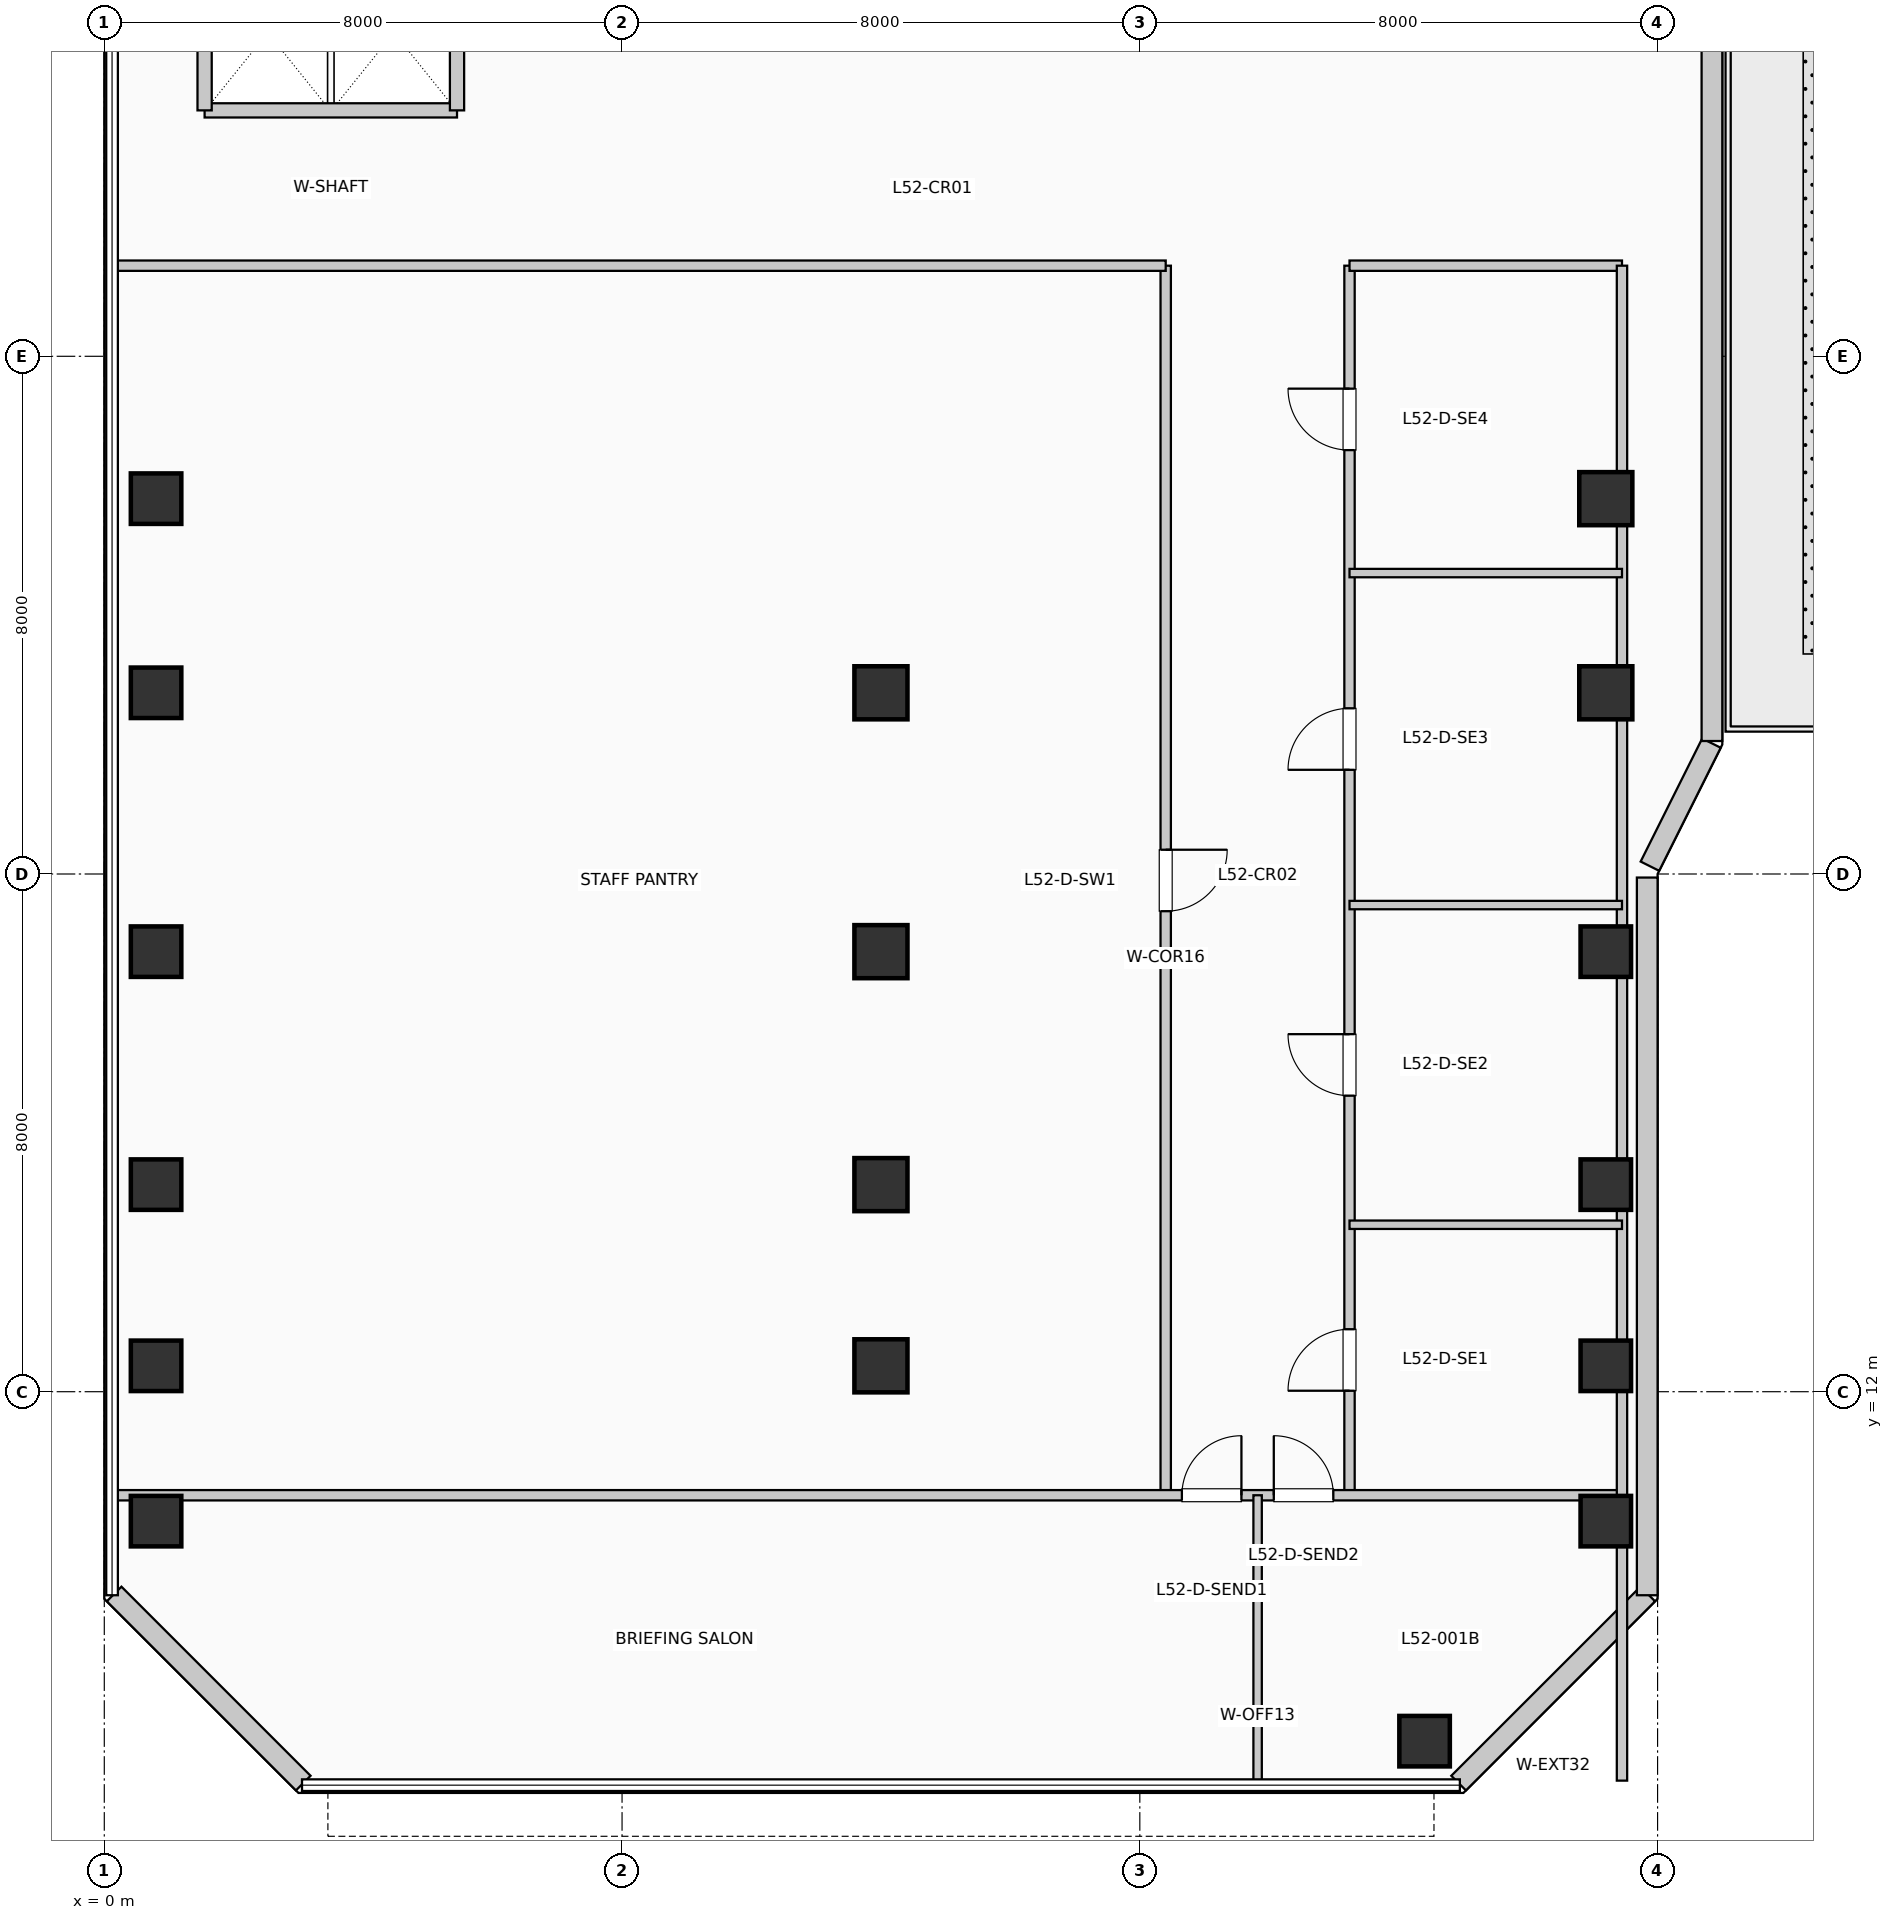
"""IFC4 building model, lengths in metres.
Left out: names, types, materials, properties, quantities, classifications, styles, units other than length and angle.
Written with IfcOpenShell. Run it as: python <this file> out.ifc"""

import sys

from ifc_helpers import new_model, si_unit, direction, frame, frame_2d, origin, origin_2d, place, context, subcontext, project, spatial, rectangle, extrude, element, fill, save


model = new_model("IFC4")
c1 = context("Model", 3, precision=1e-05, world=origin(), true_north=direction((0.0, 1.0)))
c2 = subcontext(c1, "Body", "Model", "MODEL_VIEW")
j1 = project(units=[si_unit("LENGTHUNIT", "METRE"), si_unit("PLANEANGLEUNIT", "RADIAN")], contexts=[c1])
p1 = place(None, origin())
s1 = spatial("IfcSite", under=j1, at=p1, CompositionType="ELEMENT")
p2 = place(p1, origin())
s2 = spatial("IfcBuilding", under=s1, at=p2, CompositionType="ELEMENT")
p3 = place(p2, frame((0.0, 0.0, 215.16)))
s3 = spatial("IfcBuildingStorey", under=s2, at=p3, CompositionType="ELEMENT", Elevation=215.16)
for number, where, z_axis, x_axis in (
    (1, (0.8, 10.0, 0.0), (0.0, 0.0, 1.0), (1.0, 0.0, 0.0)),
    (2, (0.8, 12.4, 0.0), (0.0, 0.0, 1.0), (1.0, 0.0, 0.0)),
    (3, (0.8, 15.2, 0.0), (0.0, 0.0, 1.0), (1.0, 0.0, 0.0)),
    (4, (0.8, 18.8, 0.0), (0.0, 0.0, 1.0), (1.0, 0.0, 0.0)),
    (5, (0.8, 22.8, 0.0), (0.0, 0.0, 1.0), (1.0, 0.0, 0.0)),
    (6, (0.8, 25.8, 0.0), (0.0, 0.0, 1.0), (1.0, 0.0, 0.0)),
):
    element("IfcColumn", number, at=place(p3, frame(where, z_axis=z_axis, x_axis=x_axis)), inside=s3, PredefinedType="COLUMN", context=c2, shape_type="SweptSolid", body=[
        extrude(rectangle(XDim=0.78, YDim=0.78, at=origin_2d()), origin(), (0.0, 0.0, 1.0), 4.62),
    ])
for number, where, z_axis, x_axis in (
    (7, (12.0, 12.4, 0.0), (0.0, 0.0, 1.0), (1.0, 0.0, 0.0)),
    (8, (12.0, 15.2, 0.0), (0.0, 0.0, 1.0), (1.0, 0.0, 0.0)),
    (9, (12.0, 18.8, 0.0), (0.0, 0.0, 1.0), (1.0, 0.0, 0.0)),
    (10, (12.0, 22.8, 0.0), (0.0, 0.0, 1.0), (1.0, 0.0, 0.0)),
):
    element("IfcColumn", number, at=place(p3, frame(where, z_axis=z_axis, x_axis=x_axis)), inside=s3, PredefinedType="COLUMN", context=c2, shape_type="SweptSolid", body=[
        extrude(rectangle(XDim=0.82, YDim=0.82, at=origin_2d()), origin(), (0.0, 0.0, 1.0), 4.62),
    ])
for number, where, z_axis, x_axis in (
    (11, (20.4, 6.6, 0.0), (0.0, 0.0, 1.0), (1.0, 0.0, 0.0)),
    (12, (23.2, 10.0, 0.0), (0.0, 0.0, 1.0), (1.0, 0.0, 0.0)),
    (13, (23.2, 12.4, 0.0), (0.0, 0.0, 1.0), (1.0, 0.0, 0.0)),
    (14, (23.2, 15.2, 0.0), (0.0, 0.0, 1.0), (1.0, 0.0, 0.0)),
    (15, (23.2, 18.8, 0.0), (0.0, 0.0, 1.0), (1.0, 0.0, 0.0)),
):
    element("IfcColumn", number, at=place(p3, frame(where, z_axis=z_axis, x_axis=x_axis)), inside=s3, PredefinedType="COLUMN", context=c2, shape_type="SweptSolid", body=[
        extrude(rectangle(XDim=0.78, YDim=0.78, at=origin_2d()), origin(), (0.0, 0.0, 1.0), 4.62),
    ])
for number, where, z_axis, x_axis in (
    (16, (23.2, 22.8, 0.0), (0.0, 0.0, 1.0), (1.0, 0.0, 0.0)),
    (17, (23.2, 25.8, 0.0), (0.0, 0.0, 1.0), (1.0, 0.0, 0.0)),
):
    element("IfcColumn", number, at=place(p3, frame(where, z_axis=z_axis, x_axis=x_axis)), inside=s3, PredefinedType="COLUMN", context=c2, shape_type="SweptSolid", body=[
        extrude(rectangle(XDim=0.82, YDim=0.82, at=origin_2d()), origin(), (0.0, 0.0, 1.0), 4.62),
    ])
p4 = place(p3, frame((20.926, 5.952, 0.0), z_axis=(0.0, 0.0, 1.0), x_axis=(0.707077242712, 0.707136318428, 0.0)))
e18 = element("IfcWall", 18, at=p4, inside=s3, PredefinedType="SOLIDWALL", context=c2, shape_type="SweptSolid", body=[
    extrude(rectangle(XDim=4.133, YDim=0.32, at=frame_2d((2.066, 0.0))), origin(), (0.0, 0.0, 1.0), 4.37),
])
p5 = place(p3, frame((23.84, 8.855, 0.0), z_axis=(0.0, 0.0, 1.0), x_axis=(0.0, 1.0, 0.0)))
e19 = element("IfcWall", 19, at=p5, inside=s3, PredefinedType="SOLIDWALL", context=c2, shape_type="SweptSolid", body=[
    extrude(rectangle(XDim=11.09, YDim=0.32, at=frame_2d((5.545, 0.0))), origin(), (0.0, 0.0, 1.0), 4.37),
])
p6 = place(p3, frame((23.882, 20.121, 0.0), z_axis=(0.0, 0.0, 1.0), x_axis=(0.447121734542, 0.894473115583, 0.0)))
e20 = element("IfcWall", 20, at=p6, inside=s3, PredefinedType="SOLIDWALL", context=c2, shape_type="SweptSolid", body=[
    extrude(rectangle(XDim=2.126, YDim=0.32, at=frame_2d((1.063, 0.0))), origin(), (0.0, 0.0, 1.0), 4.37),
])
p7 = place(p3, frame((24.84, 22.055, 0.0), z_axis=(0.0, 0.0, 1.0), x_axis=(0.0, 1.0, 0.0)))
e21 = element("IfcWall", 21, at=p7, inside=s3, PredefinedType="SOLIDWALL", context=c2, shape_type="SweptSolid", body=[
    extrude(rectangle(XDim=19.09, YDim=0.32, at=frame_2d((9.545, 0.0))), origin(), (0.0, 0.0, 1.0), 4.37),
])
p8 = place(p7, frame((14.245, 0.0, 0.0), z_axis=(0.0, 0.0, 1.0), x_axis=(-1.0, 0.0, 0.0)))
e22 = element("IfcOpeningElement", 22, at=p8, cuts=e21, PredefinedType="OPENING", context=c2, shape_type="SweptSolid", body=[
    extrude(rectangle(XDim=1.1, YDim=2.2, at=frame_2d((0.55, 1.1))), frame((0.0, 0.17, 0.0), z_axis=(0.0, -1.0, 0.0), x_axis=(1.0, 0.0, 0.0)), (0.0, 0.0, 1.0), 0.34),
])
p9 = place(p3, frame((0.152, 8.874, 0.0), z_axis=(0.0, 0.0, 1.0), x_axis=(0.707077242712, -0.707136318428, 0.0)))
e23 = element("IfcWall", 23, at=p9, inside=s3, PredefinedType="SOLIDWALL", context=c2, shape_type="SweptSolid", body=[
    extrude(rectangle(XDim=4.133, YDim=0.32, at=frame_2d((2.066, 0.0))), origin(), (0.0, 0.0, 1.0), 4.37),
])
p10 = place(p3, frame((1.55, 31.8, 0.0), z_axis=(0.0, 0.0, 1.0), x_axis=(1.0, 0.0, 0.0)))
e24 = element("IfcWall", 24, at=p10, inside=s3, PredefinedType="PARTITIONING", context=c2, shape_type="SweptSolid", body=[
    extrude(rectangle(XDim=3.9, YDim=0.22, at=frame_2d((1.95, 0.0))), origin(), (0.0, 0.0, 1.0), 4.37),
])
for number, where, z_axis, x_axis in (
    (25, (1.55, 31.8, 0.0), (0.0, 0.0, 1.0), (0.0, 1.0, 0.0)),
    (26, (5.45, 31.8, 0.0), (0.0, 0.0, 1.0), (0.0, 1.0, 0.0)),
):
    element("IfcWall", number, at=place(p3, frame(where, z_axis=z_axis, x_axis=x_axis)), inside=s3, PredefinedType="PARTITIONING", context=c2, shape_type="SweptSolid", body=[
        extrude(rectangle(XDim=2.38, YDim=0.22, at=frame_2d((1.19, 0.0))), origin(), (0.0, 0.0, 1.0), 4.37),
    ])
p11 = place(p3, frame((16.4, 10.4, 0.0), z_axis=(0.0, 0.0, 1.0), x_axis=(0.0, 1.0, 0.0)))
e27 = element("IfcWall", 27, at=p11, inside=s3, PredefinedType="PARTITIONING", context=c2, shape_type="SweptSolid", body=[
    extrude(rectangle(XDim=19.0, YDim=0.16, at=frame_2d((9.5, 0.0))), origin(), (0.0, 0.0, 1.0), 4.37),
])
p12 = place(p11, frame((9.975, 0.0, 0.0), z_axis=(0.0, 0.0, 1.0), x_axis=(-1.0, 0.0, 0.0)))
e28 = element("IfcOpeningElement", 28, at=p12, cuts=e27, PredefinedType="OPENING", context=c2, shape_type="SweptSolid", body=[
    extrude(rectangle(XDim=0.95, YDim=2.15, at=frame_2d((0.475, 1.075))), frame((0.0, 0.09, 0.0), z_axis=(0.0, -1.0, 0.0), x_axis=(1.0, 0.0, 0.0)), (0.0, 0.0, 1.0), 0.18),
])
p13 = place(p3, frame((19.24, 10.4, 0.0), z_axis=(0.0, 0.0, 1.0), x_axis=(0.0, 1.0, 0.0)))
e29 = element("IfcWall", 29, at=p13, inside=s3, PredefinedType="PARTITIONING", context=c2, shape_type="SweptSolid", body=[
    extrude(rectangle(XDim=19.0, YDim=0.16, at=frame_2d((9.5, 0.0))), origin(), (0.0, 0.0, 1.0), 4.37),
])
p14 = place(p13, frame((1.615, 0.0, 0.0)))
e30 = element("IfcOpeningElement", 30, at=p14, cuts=e29, PredefinedType="OPENING", context=c2, shape_type="SweptSolid", body=[
    extrude(rectangle(XDim=0.95, YDim=2.15, at=frame_2d((0.475, 1.075))), frame((0.0, 0.09, 0.0), z_axis=(0.0, -1.0, 0.0), x_axis=(1.0, 0.0, 0.0)), (0.0, 0.0, 1.0), 0.18),
])
p15 = place(p13, frame((6.175, 0.0, 0.0)))
e31 = element("IfcOpeningElement", 31, at=p15, cuts=e29, PredefinedType="OPENING", context=c2, shape_type="SweptSolid", body=[
    extrude(rectangle(XDim=0.95, YDim=2.15, at=frame_2d((0.475, 1.075))), frame((0.0, 0.09, 0.0), z_axis=(0.0, -1.0, 0.0), x_axis=(1.0, 0.0, 0.0)), (0.0, 0.0, 1.0), 0.18),
])
p16 = place(p13, frame((11.21, 0.0, 0.0)))
e32 = element("IfcOpeningElement", 32, at=p16, cuts=e29, PredefinedType="OPENING", context=c2, shape_type="SweptSolid", body=[
    extrude(rectangle(XDim=0.95, YDim=2.15, at=frame_2d((0.475, 1.075))), frame((0.0, 0.09, 0.0), z_axis=(0.0, -1.0, 0.0), x_axis=(1.0, 0.0, 0.0)), (0.0, 0.0, 1.0), 0.18),
])
p17 = place(p13, frame((16.15, 0.0, 0.0)))
e33 = element("IfcOpeningElement", 33, at=p17, cuts=e29, PredefinedType="OPENING", context=c2, shape_type="SweptSolid", body=[
    extrude(rectangle(XDim=0.95, YDim=2.15, at=frame_2d((0.475, 1.075))), frame((0.0, 0.09, 0.0), z_axis=(0.0, -1.0, 0.0), x_axis=(1.0, 0.0, 0.0)), (0.0, 0.0, 1.0), 0.18),
])
p18 = place(p3, frame((0.19, 10.4, 0.0), z_axis=(0.0, 0.0, 1.0), x_axis=(1.0, 0.0, 0.0)))
e34 = element("IfcWall", 34, at=p18, inside=s3, PredefinedType="PARTITIONING", context=c2, shape_type="SweptSolid", body=[
    extrude(rectangle(XDim=23.26, YDim=0.16, at=frame_2d((11.63, 0.0))), origin(), (0.0, 0.0, 1.0), 3.755),
])
p19 = place(p18, frame((16.46, 0.0, 0.0)))
e35 = element("IfcOpeningElement", 35, at=p19, cuts=e34, PredefinedType="OPENING", context=c2, shape_type="SweptSolid", body=[
    extrude(rectangle(XDim=0.92, YDim=2.1, at=frame_2d((0.46, 1.05))), frame((0.0, 0.09, 0.0), z_axis=(0.0, -1.0, 0.0), x_axis=(1.0, 0.0, 0.0)), (0.0, 0.0, 1.0), 0.18),
])
p20 = place(p18, frame((17.88, 0.0, 0.0)))
e36 = element("IfcOpeningElement", 36, at=p20, cuts=e34, PredefinedType="OPENING", context=c2, shape_type="SweptSolid", body=[
    extrude(rectangle(XDim=0.92, YDim=2.1, at=frame_2d((0.46, 1.05))), frame((0.0, 0.09, 0.0), z_axis=(0.0, -1.0, 0.0), x_axis=(1.0, 0.0, 0.0)), (0.0, 0.0, 1.0), 0.18),
])
p21 = place(p3, frame((0.19, 29.4, 0.0), z_axis=(0.0, 0.0, 1.0), x_axis=(1.0, 0.0, 0.0)))
e37 = element("IfcWall", 37, at=p21, inside=s3, PredefinedType="PARTITIONING", context=c2, shape_type="SweptSolid", body=[
    extrude(rectangle(XDim=16.21, YDim=0.16, at=frame_2d((8.105, 0.0))), origin(), (0.0, 0.0, 1.0), 4.025),
])
p22 = place(p3, frame((19.24, 29.4, 0.0), z_axis=(0.0, 0.0, 1.0), x_axis=(1.0, 0.0, 0.0)))
e38 = element("IfcWall", 38, at=p22, inside=s3, PredefinedType="PARTITIONING", context=c2, shape_type="SweptSolid", body=[
    extrude(rectangle(XDim=4.21, YDim=0.16, at=frame_2d((2.105, 0.0))), origin(), (0.0, 0.0, 1.0), 4.025),
])
p23 = place(p3, frame((23.45, 5.99, 0.0), z_axis=(0.0, 0.0, 1.0), x_axis=(0.0, 1.0, 0.0)))
e39 = element("IfcWall", 39, at=p23, inside=s3, PredefinedType="PARTITIONING", context=c2, shape_type="SweptSolid", body=[
    extrude(rectangle(XDim=23.41, YDim=0.16, at=frame_2d((11.705, 0.0))), origin(), (0.0, 0.0, 1.0), 3.755),
])
p24 = place(p3, frame((17.82, 5.99, 0.0), z_axis=(0.0, 0.0, 1.0), x_axis=(0.0, 1.0, 0.0)))
e40 = element("IfcWall", 40, at=p24, inside=s3, PredefinedType="PARTITIONING", context=c2, shape_type="SweptSolid", body=[
    extrude(rectangle(XDim=4.41, YDim=0.13, at=frame_2d((2.205, 0.0))), origin(), (0.0, 0.0, 1.0), 4.37),
])
for number, where, z_axis, x_axis in (
    (41, (19.24, 14.58, 0.0), (0.0, 0.0, 1.0), (1.0, 0.0, 0.0)),
    (42, (19.24, 19.52, 0.0), (0.0, 0.0, 1.0), (1.0, 0.0, 0.0)),
    (43, (19.24, 24.65, 0.0), (0.0, 0.0, 1.0), (1.0, 0.0, 0.0)),
):
    element("IfcWall", number, at=place(p3, frame(where, z_axis=z_axis, x_axis=x_axis)), inside=s3, PredefinedType="PARTITIONING", context=c2, shape_type="SweptSolid", body=[
        extrude(rectangle(XDim=4.21, YDim=0.13, at=frame_2d((2.105, 0.0))), origin(), (0.0, 0.0, 1.0), 4.37),
    ])
p25 = place(p19, origin())
e44 = element("IfcDoor", 44, at=p25, inside=s3, OperationType="SINGLE_SWING_RIGHT", PredefinedType="DOOR", context=c2, shape_type="SweptSolid", body=[
    extrude(rectangle(XDim=0.92, YDim=2.1, at=frame_2d((0.46, 1.05))), frame((0.0, 0.025, 0.0), z_axis=(0.0, -1.0, 0.0), x_axis=(1.0, 0.0, 0.0)), (0.0, 0.0, 1.0), 0.05),
])
fill(e35, e44)
p26 = place(p20, origin())
e45 = element("IfcDoor", 45, at=p26, inside=s3, OperationType="SINGLE_SWING_LEFT", PredefinedType="DOOR", context=c2, shape_type="SweptSolid", body=[
    extrude(rectangle(XDim=0.92, YDim=2.1, at=frame_2d((0.46, 1.05))), frame((0.0, 0.025, 0.0), z_axis=(0.0, -1.0, 0.0), x_axis=(1.0, 0.0, 0.0)), (0.0, 0.0, 1.0), 0.05),
])
fill(e36, e45)
p27 = place(p12, origin())
e46 = element("IfcDoor", 46, at=p27, inside=s3, OperationType="SINGLE_SWING_RIGHT", PredefinedType="DOOR", context=c2, shape_type="SweptSolid", body=[
    extrude(rectangle(XDim=0.95, YDim=2.15, at=frame_2d((0.475, 1.075))), frame((0.0, 0.025, 0.0), z_axis=(0.0, -1.0, 0.0), x_axis=(1.0, 0.0, 0.0)), (0.0, 0.0, 1.0), 0.05),
])
fill(e28, e46)
p28 = place(p14, origin())
e47 = element("IfcDoor", 47, at=p28, inside=s3, OperationType="SINGLE_SWING_LEFT", PredefinedType="DOOR", context=c2, shape_type="SweptSolid", body=[
    extrude(rectangle(XDim=0.95, YDim=2.15, at=frame_2d((0.475, 1.075))), frame((0.0, 0.025, 0.0), z_axis=(0.0, -1.0, 0.0), x_axis=(1.0, 0.0, 0.0)), (0.0, 0.0, 1.0), 0.05),
])
fill(e30, e47)
p29 = place(p15, origin())
e48 = element("IfcDoor", 48, at=p29, inside=s3, OperationType="SINGLE_SWING_RIGHT", PredefinedType="DOOR", context=c2, shape_type="SweptSolid", body=[
    extrude(rectangle(XDim=0.95, YDim=2.15, at=frame_2d((0.475, 1.075))), frame((0.0, 0.025, 0.0), z_axis=(0.0, -1.0, 0.0), x_axis=(1.0, 0.0, 0.0)), (0.0, 0.0, 1.0), 0.05),
])
fill(e31, e48)
p30 = place(p16, origin())
e49 = element("IfcDoor", 49, at=p30, inside=s3, OperationType="SINGLE_SWING_LEFT", PredefinedType="DOOR", context=c2, shape_type="SweptSolid", body=[
    extrude(rectangle(XDim=0.95, YDim=2.15, at=frame_2d((0.475, 1.075))), frame((0.0, 0.025, 0.0), z_axis=(0.0, -1.0, 0.0), x_axis=(1.0, 0.0, 0.0)), (0.0, 0.0, 1.0), 0.05),
])
fill(e32, e49)
p31 = place(p17, origin())
e50 = element("IfcDoor", 50, at=p31, inside=s3, OperationType="SINGLE_SWING_RIGHT", PredefinedType="DOOR", context=c2, shape_type="SweptSolid", body=[
    extrude(rectangle(XDim=0.95, YDim=2.15, at=frame_2d((0.475, 1.075))), frame((0.0, 0.025, 0.0), z_axis=(0.0, -1.0, 0.0), x_axis=(1.0, 0.0, 0.0)), (0.0, 0.0, 1.0), 0.05),
])
fill(e33, e50)
save(model, sys.argv[1])
